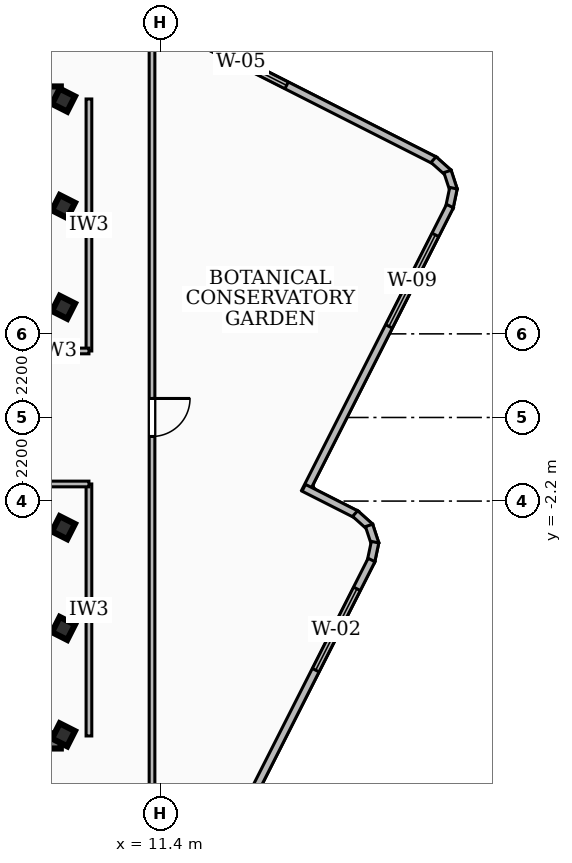
"""IFC4 building model, lengths in metres.
Left out: names, types, materials, properties, quantities, classifications, styles, units other than length and angle.
Written with IfcOpenShell. Run it as: python <this file> out.ifc"""

import sys

from ifc_helpers import new_model, si_unit, direction, frame, frame_2d, origin, origin_2d, place, context, subcontext, project, spatial, rectangle, hollow_rectangle, extrude, element, fill, save


model = new_model("IFC4")
c1 = context("Model", 3, precision=1e-05, world=origin(), true_north=direction((0.0, 1.0)))
c2 = subcontext(c1, "Body", "Model", "MODEL_VIEW")
j1 = project(units=[si_unit("LENGTHUNIT", "METRE"), si_unit("PLANEANGLEUNIT", "RADIAN")], contexts=[c1])
p1 = place(None, origin())
s1 = spatial("IfcSite", under=j1, at=p1, CompositionType="ELEMENT")
p2 = place(p1, origin())
s2 = spatial("IfcBuilding", under=s1, at=p2, CompositionType="ELEMENT")
p3 = place(p2, frame((0.0, 0.0, 289.26)))
s3 = spatial("IfcBuildingStorey", under=s2, at=p3, CompositionType="ELEMENT", Elevation=289.26)
for number, where, z_axis, x_axis in (
    (1, (-8.78, 8.51, 0.0), (0.0, 0.0, 1.0), (1.0, 0.0, 0.0)),
    (2, (8.78, -8.51, 0.0), (0.0, 0.0, 1.0), (-1.0, 0.0, 0.0)),
):
    element("IfcWall", number, at=place(p3, frame(where, z_axis=z_axis, x_axis=x_axis)), inside=s3, PredefinedType="SHEAR", context=c2, shape_type="SweptSolid", body=[
        extrude(rectangle(XDim=17.56, YDim=0.4, at=frame_2d((8.78, 0.0))), origin(), (0.0, 0.0, 1.0), 3.84),
    ])
for number, where, z_axis, x_axis in (
    (3, (8.85, -5.55, 0.0), (0.0, 0.0, 1.0), (0.452, 0.892, 0.0)),
    (4, (8.85, -2.9, 0.0), (0.0, 0.0, 1.0), (0.452, 0.892, 0.0)),
    (5, (8.85, 2.9, 0.0), (0.0, 0.0, 1.0), (0.452, 0.892, 0.0)),
    (6, (8.85, 5.55, 0.0), (0.0, 0.0, 1.0), (0.452, 0.892, 0.0)),
    (7, (8.85, -8.35, 0.0), (0.0, 0.0, 1.0), (0.452, 0.892, 0.0)),
    (8, (8.85, 8.35, 0.0), (0.0, 0.0, 1.0), (0.452, 0.892, 0.0)),
):
    element("IfcColumn", number, at=place(p3, frame(where, z_axis=z_axis, x_axis=x_axis)), inside=s3, PredefinedType="COLUMN", context=c2, shape_type="SweptSolid", body=[
        extrude(hollow_rectangle(XDim=0.45, YDim=0.45, WallThickness=0.022, at=origin_2d()), origin(), (0.0, 0.0, 1.0), 4.14),
    ])
p4 = place(p3, frame((11.109, 10.569, 0.0), z_axis=(0.0, 0.0, 1.0), x_axis=(0.891946408024, -0.452141134176, 0.0)))
e9 = element("IfcWall", 9, at=p4, inside=s3, PredefinedType="SOLIDWALL", context=c2, shape_type="SweptSolid", body=[
    extrude(rectangle(XDim=8.431, YDim=0.2, at=frame_2d((4.215, 0.0))), origin(), (0.0, 0.0, 1.0), 3.84),
])
p5 = place(p4, frame((1.35, 0.0, 0.85)))
e10 = element("IfcOpeningElement", 10, at=p5, cuts=e9, PredefinedType="OPENING", context=c2, shape_type="SweptSolid", body=[
    extrude(rectangle(XDim=2.7, YDim=1.85, at=frame_2d((1.35, 0.925))), frame((0.0, 0.11, 0.0), z_axis=(0.0, -1.0, 0.0), x_axis=(1.0, 0.0, 0.0)), (0.0, 0.0, 1.0), 0.22),
])
p6 = place(p3, frame((18.588, 6.785, 0.0), z_axis=(0.0, 0.0, 1.0), x_axis=(0.745954062295, -0.665997400104, 0.0)))
e11 = element("IfcWall", 11, at=p6, inside=s3, PredefinedType="SOLIDWALL", context=c2, shape_type="SweptSolid", body=[
    extrude(rectangle(XDim=0.528, YDim=0.2, at=frame_2d((0.264, 0.0))), origin(), (0.0, 0.0, 1.0), 3.84),
])
p7 = place(p3, frame((18.955, 6.474, 0.0), z_axis=(0.0, 0.0, 1.0), x_axis=(0.310813054196, -0.950471064968, 0.0)))
e12 = element("IfcWall", 12, at=p7, inside=s3, PredefinedType="SOLIDWALL", context=c2, shape_type="SweptSolid", body=[
    extrude(rectangle(XDim=0.514, YDim=0.2, at=frame_2d((0.257, 0.0))), origin(), (0.0, 0.0, 1.0), 3.84),
])
p8 = place(p3, frame((19.112, 6.033, 0.0), z_axis=(0.0, 0.0, 1.0), x_axis=(-0.205193375664, -0.978721450967, 0.0)))
e13 = element("IfcWall", 13, at=p8, inside=s3, PredefinedType="SOLIDWALL", context=c2, shape_type="SweptSolid", body=[
    extrude(rectangle(XDim=0.527, YDim=0.2, at=frame_2d((0.264, 0.0))), origin(), (0.0, 0.0, 1.0), 3.84),
])
p9 = place(p3, frame((19.02, 5.563, 0.0), z_axis=(0.0, 0.0, 1.0), x_axis=(-0.452141134176, -0.891946408024, 0.0)))
e14 = element("IfcWall", 14, at=p9, inside=s3, PredefinedType="SOLIDWALL", context=c2, shape_type="SweptSolid", body=[
    extrude(rectangle(XDim=8.431, YDim=0.2, at=frame_2d((4.215, 0.0))), origin(), (0.0, 0.0, 1.0), 3.84),
])
p10 = place(p9, frame((0.85, 0.0, 0.85)))
e15 = element("IfcOpeningElement", 15, at=p10, cuts=e14, PredefinedType="OPENING", context=c2, shape_type="SweptSolid", body=[
    extrude(rectangle(XDim=2.7, YDim=1.65, at=frame_2d((1.35, 0.825))), frame((0.0, 0.11, 0.0), z_axis=(0.0, -1.0, 0.0), x_axis=(1.0, 0.0, 0.0)), (0.0, 0.0, 1.0), 0.22),
])
p11 = place(p3, frame((15.173, -1.85, 0.0), z_axis=(0.0, 0.0, 1.0), x_axis=(0.892006356627, -0.452022853113, 0.0)))
e16 = element("IfcWall", 16, at=p11, inside=s3, PredefinedType="SOLIDWALL", context=c2, shape_type="SweptSolid", body=[
    extrude(rectangle(XDim=1.562, YDim=0.2, at=frame_2d((0.781, 0.0))), origin(), (0.0, 0.0, 1.0), 3.84),
])
p12 = place(p3, frame((16.525, -2.528, 0.0), z_axis=(0.0, 0.0, 1.0), x_axis=(0.743983074, -0.668198462735, 0.0)))
e17 = element("IfcWall", 17, at=p12, inside=s3, PredefinedType="SOLIDWALL", context=c2, shape_type="SweptSolid", body=[
    extrude(rectangle(XDim=0.528, YDim=0.2, at=frame_2d((0.264, 0.0))), origin(), (0.0, 0.0, 1.0), 3.84),
])
p13 = place(p3, frame((16.891, -2.84, 0.0), z_axis=(0.0, 0.0, 1.0), x_axis=(0.312526265177, -0.949909118587, 0.0)))
e18 = element("IfcWall", 18, at=p13, inside=s3, PredefinedType="SOLIDWALL", context=c2, shape_type="SweptSolid", body=[
    extrude(rectangle(XDim=0.515, YDim=0.2, at=frame_2d((0.257, 0.0))), origin(), (0.0, 0.0, 1.0), 3.84),
])
p14 = place(p3, frame((17.049, -3.281, 0.0), z_axis=(0.0, 0.0, 1.0), x_axis=(-0.207342794077, -0.978268350579, 0.0)))
e19 = element("IfcWall", 19, at=p14, inside=s3, PredefinedType="SOLIDWALL", context=c2, shape_type="SweptSolid", body=[
    extrude(rectangle(XDim=0.526, YDim=0.2, at=frame_2d((0.263, 0.0))), origin(), (0.0, 0.0, 1.0), 3.84),
])
p15 = place(p3, frame((16.956, -3.75, 0.0), z_axis=(0.0, 0.0, 1.0), x_axis=(-0.452065793094, -0.891984595559, 0.0)))
e20 = element("IfcWall", 20, at=p15, inside=s3, PredefinedType="SOLIDWALL", context=c2, shape_type="SweptSolid", body=[
    extrude(rectangle(XDim=8.643, YDim=0.2, at=frame_2d((4.321, 0.0))), origin(), (0.0, 0.0, 1.0), 3.84),
])
p16 = place(p15, frame((0.85, 0.0, 0.85)))
e21 = element("IfcOpeningElement", 21, at=p16, cuts=e20, PredefinedType="OPENING", context=c2, shape_type="SweptSolid", body=[
    extrude(rectangle(XDim=2.4, YDim=2.1, at=frame_2d((1.2, 1.05))), frame((0.0, 0.11, 0.0), z_axis=(0.0, -1.0, 0.0), x_axis=(1.0, 0.0, 0.0)), (0.0, 0.0, 1.0), 0.22),
])
p17 = place(p3, frame((9.52, 1.75, 0.0), z_axis=(0.0, 0.0, 1.0), x_axis=(0.0, 1.0, 0.0)))
e22 = element("IfcWall", 22, at=p17, inside=s3, PredefinedType="PARTITIONING", context=c2, shape_type="SweptSolid", body=[
    extrude(rectangle(XDim=6.63, YDim=0.15, at=frame_2d((3.315, 0.0))), origin(), (0.0, 0.0, 1.0), 3.84),
])
p18 = place(p3, frame((7.85, 1.75, 0.0), z_axis=(0.0, 0.0, 1.0), x_axis=(1.0, 0.0, 0.0)))
e23 = element("IfcWall", 23, at=p18, inside=s3, PredefinedType="PARTITIONING", context=c2, shape_type="SweptSolid", body=[
    extrude(rectangle(XDim=1.67, YDim=0.15, at=frame_2d((0.835, 0.0))), origin(), (0.0, 0.0, 1.0), 3.07),
])
p19 = place(p3, frame((9.52, -8.38, 0.0), z_axis=(0.0, 0.0, 1.0), x_axis=(0.0, 1.0, 0.0)))
e24 = element("IfcWall", 24, at=p19, inside=s3, PredefinedType="PARTITIONING", context=c2, shape_type="SweptSolid", body=[
    extrude(rectangle(XDim=6.63, YDim=0.15, at=frame_2d((3.315, 0.0))), origin(), (0.0, 0.0, 1.0), 3.21),
])
p20 = place(p3, frame((7.85, -1.75, 0.0), z_axis=(0.0, 0.0, 1.0), x_axis=(1.0, 0.0, 0.0)))
e25 = element("IfcWall", 25, at=p20, inside=s3, PredefinedType="PARTITIONING", context=c2, shape_type="SweptSolid", body=[
    extrude(rectangle(XDim=1.67, YDim=0.15, at=frame_2d((0.835, 0.0))), origin(), (0.0, 0.0, 1.0), 3.07),
])
p21 = place(p3, frame((11.18, 10.522, 0.0), z_axis=(0.0, 0.0, 1.0), x_axis=(0.0, -1.0, 0.0)))
e26 = element("IfcWall", 26, at=p21, inside=s3, PredefinedType="PARTITIONING", context=c2, shape_type="SweptSolid", body=[
    extrude(rectangle(XDim=21.957, YDim=0.15, at=frame_2d((10.979, 0.0))), origin(), (0.0, 0.0, 1.0), 3.84),
])
p22 = place(p21, frame((10.022, 0.0, 0.0)))
e27 = element("IfcOpeningElement", 27, at=p22, cuts=e26, PredefinedType="OPENING", context=c2, shape_type="SweptSolid", body=[
    extrude(rectangle(XDim=1.0, YDim=2.1, at=frame_2d((0.5, 1.05))), frame((0.0, 0.085, 0.0), z_axis=(0.0, -1.0, 0.0), x_axis=(1.0, 0.0, 0.0)), (0.0, 0.0, 1.0), 0.17),
])
p23 = place(p5, origin())
e28 = element("IfcWindow", 28, at=p23, inside=s3, PartitioningType="SINGLE_PANEL", PredefinedType="WINDOW", context=c2, shape_type="SweptSolid", body=[
    extrude(rectangle(XDim=2.7, YDim=1.85, at=frame_2d((1.35, 0.925))), frame((0.0, 0.03, 0.0), z_axis=(0.0, -1.0, 0.0), x_axis=(1.0, 0.0, 0.0)), (0.0, 0.0, 1.0), 0.06),
])
fill(e10, e28)
p24 = place(p10, origin())
e29 = element("IfcWindow", 29, at=p24, inside=s3, PartitioningType="SINGLE_PANEL", PredefinedType="WINDOW", context=c2, shape_type="SweptSolid", body=[
    extrude(rectangle(XDim=2.7, YDim=1.65, at=frame_2d((1.35, 0.825))), frame((0.0, 0.03, 0.0), z_axis=(0.0, -1.0, 0.0), x_axis=(1.0, 0.0, 0.0)), (0.0, 0.0, 1.0), 0.06),
])
fill(e15, e29)
p25 = place(p16, origin())
e30 = element("IfcWindow", 30, at=p25, inside=s3, PartitioningType="SINGLE_PANEL", PredefinedType="WINDOW", context=c2, shape_type="SweptSolid", body=[
    extrude(rectangle(XDim=2.4, YDim=2.1, at=frame_2d((1.2, 1.05))), frame((0.0, 0.03, 0.0), z_axis=(0.0, -1.0, 0.0), x_axis=(1.0, 0.0, 0.0)), (0.0, 0.0, 1.0), 0.06),
])
fill(e21, e30)
p26 = place(p22, origin())
e31 = element("IfcDoor", 31, at=p26, inside=s3, OperationType="SINGLE_SWING_LEFT", PredefinedType="DOOR", context=c2, shape_type="SweptSolid", body=[
    extrude(rectangle(XDim=1.0, YDim=2.1, at=frame_2d((0.5, 1.05))), frame((0.0, 0.025, 0.0), z_axis=(0.0, -1.0, 0.0), x_axis=(1.0, 0.0, 0.0)), (0.0, 0.0, 1.0), 0.05),
])
fill(e27, e31)
save(model, sys.argv[1])
